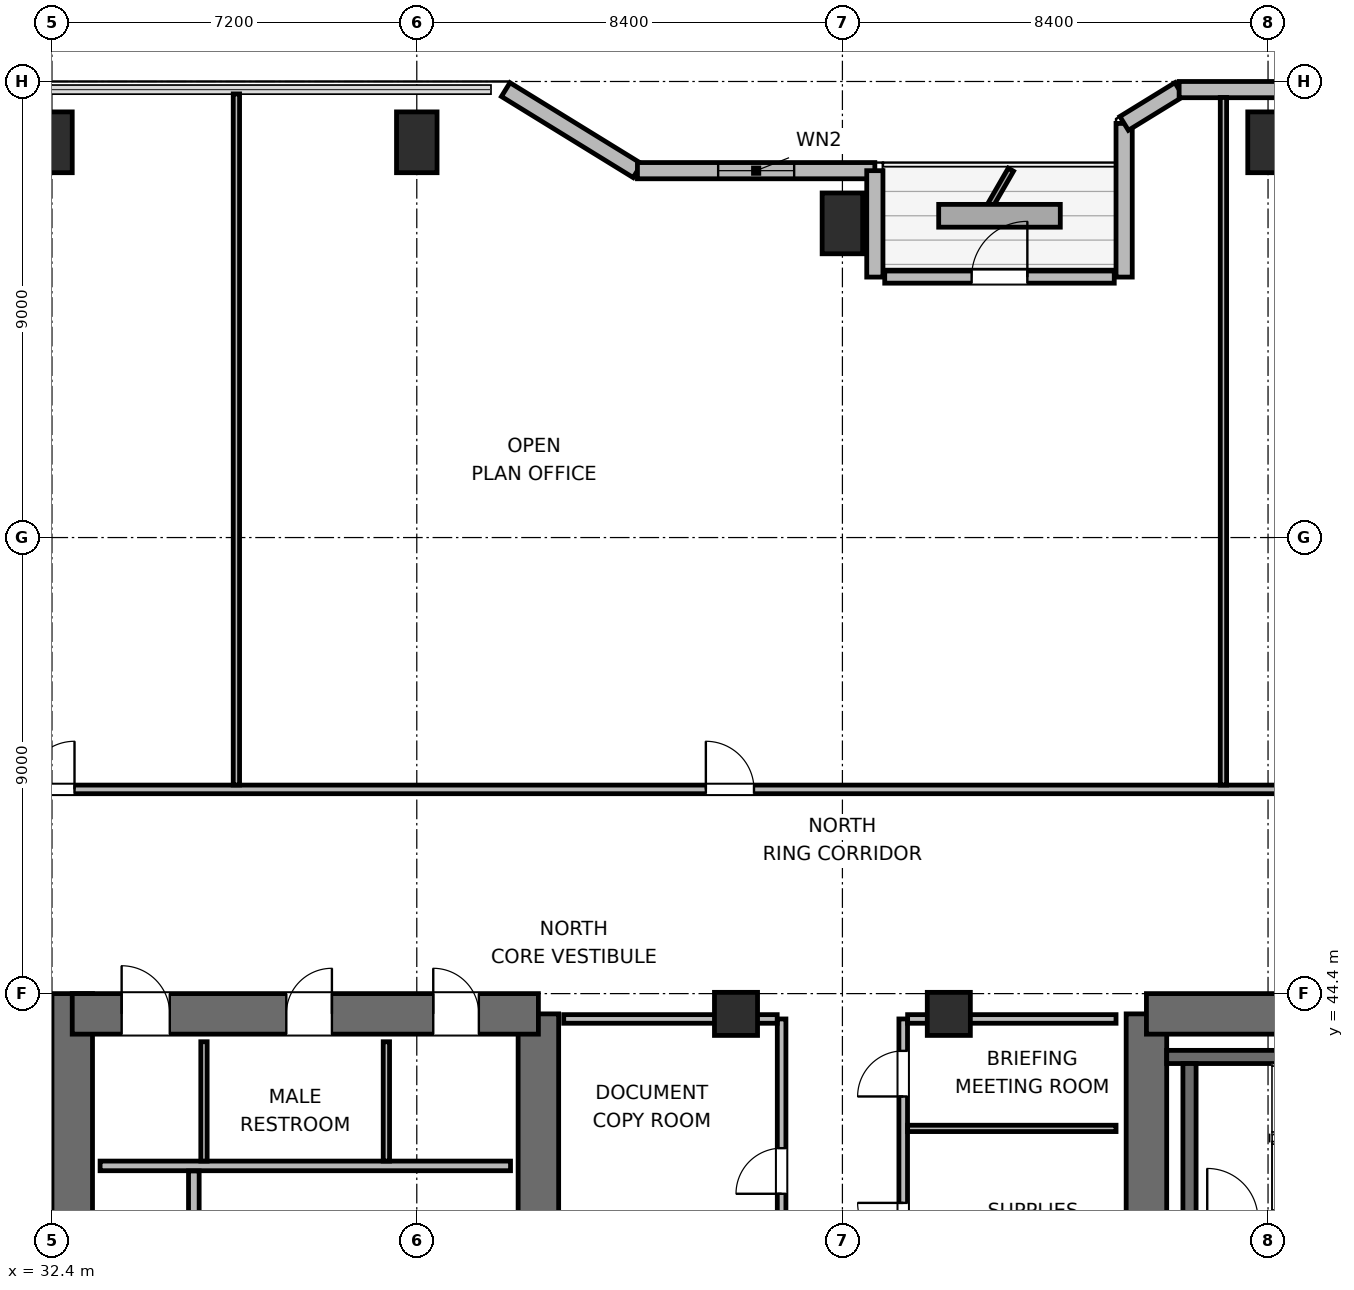
"""IFC4 building model, lengths in metres.
Left out: names, types, materials, properties, quantities, classifications, styles, units other than length and angle.
Written with IfcOpenShell. Run it as: python <this file> out.ifc"""

import sys

from ifc_helpers import new_model, si_unit, direction, frame, frame_2d, origin, origin_2d, place, context, subcontext, project, spatial, rectangle, extrude, element, fill, save


model = new_model("IFC4")
c1 = context("Model", 3, precision=1e-05, world=origin(), true_north=direction((0.0, 1.0)))
c2 = subcontext(c1, "Body", "Model", "MODEL_VIEW")
j1 = project(units=[si_unit("LENGTHUNIT", "METRE"), si_unit("PLANEANGLEUNIT", "RADIAN")], contexts=[c1])
p1 = place(None, origin())
s1 = spatial("IfcSite", under=j1, at=p1, CompositionType="ELEMENT")
p2 = place(p1, origin())
s2 = spatial("IfcBuilding", under=s1, at=p2, CompositionType="ELEMENT")
p3 = place(p2, frame((0.0, 0.0, 109.2)))
s3 = spatial("IfcBuildingStorey", under=s2, at=p3, CompositionType="ELEMENT", Elevation=109.2)
p4 = place(p3, frame((32.8, 27.6, 0.0), z_axis=(0.0, 0.0, 1.0), x_axis=(0.0, 1.0, 0.0)))
e1 = element("IfcWall", 1, at=p4, inside=s3, PredefinedType="SHEAR", context=c2, shape_type="SweptSolid", body=[
    extrude(rectangle(XDim=16.8, YDim=0.8, at=frame_2d((8.4, 0.0))), origin(), (0.0, 0.0, 1.0), 3.9),
])
p5 = place(p3, frame((42.0, 37.8, 0.0), z_axis=(0.0, 0.0, 1.0), x_axis=(0.0, 1.0, 0.0)))
e2 = element("IfcWall", 2, at=p5, inside=s3, PredefinedType="SHEAR", context=c2, shape_type="SweptSolid", body=[
    extrude(rectangle(XDim=6.2, YDim=0.8, at=frame_2d((3.1, 0.0))), origin(), (0.0, 0.0, 1.0), 3.9),
])
p6 = place(p3, frame((32.8, 44.0, 0.0), z_axis=(0.0, 0.0, 1.0), x_axis=(1.0, 0.0, 0.0)))
e3 = element("IfcWall", 3, at=p6, inside=s3, PredefinedType="SHEAR", context=c2, shape_type="SweptSolid", body=[
    extrude(rectangle(XDim=9.2, YDim=0.8, at=frame_2d((4.6, 0.0))), origin(), (0.0, 0.0, 1.0), 3.9),
])
p7 = place(p6, frame((0.975, 0.0, 0.0)))
e4 = element("IfcOpeningElement", 4, at=p7, cuts=e3, PredefinedType="OPENING", context=c2, shape_type="SweptSolid", body=[
    extrude(rectangle(XDim=0.95, YDim=2.04, at=frame_2d((0.475, 1.02))), frame((0.0, 0.41, 0.0), z_axis=(0.0, -1.0, 0.0), x_axis=(1.0, 0.0, 0.0)), (0.0, 0.0, 1.0), 0.82),
])
p8 = place(p6, frame((4.225, 0.0, 0.0)))
e5 = element("IfcOpeningElement", 5, at=p8, cuts=e3, PredefinedType="OPENING", context=c2, shape_type="SweptSolid", body=[
    extrude(rectangle(XDim=0.9, YDim=2.02, at=frame_2d((0.45, 1.01))), frame((0.0, 0.41, 0.0), z_axis=(0.0, -1.0, 0.0), x_axis=(1.0, 0.0, 0.0)), (0.0, 0.0, 1.0), 0.82),
])
p9 = place(p6, frame((7.125, 0.0, 0.0)))
e6 = element("IfcOpeningElement", 6, at=p9, cuts=e3, PredefinedType="OPENING", context=c2, shape_type="SweptSolid", body=[
    extrude(rectangle(XDim=0.9, YDim=2.02, at=frame_2d((0.45, 1.01))), frame((0.0, 0.41, 0.0), z_axis=(0.0, -1.0, 0.0), x_axis=(1.0, 0.0, 0.0)), (0.0, 0.0, 1.0), 0.82),
])
p10 = place(p3, frame((54.0, 38.0, 0.0), z_axis=(0.0, 0.0, 1.0), x_axis=(0.0, 1.0, 0.0)))
e7 = element("IfcWall", 7, at=p10, inside=s3, PredefinedType="SHEAR", context=c2, shape_type="SweptSolid", body=[
    extrude(rectangle(XDim=6.0, YDim=0.8, at=frame_2d((3.0, 0.0))), origin(), (0.0, 0.0, 1.0), 3.9),
])
p11 = place(p3, frame((54.0, 44.0, 0.0), z_axis=(0.0, 0.0, 1.0), x_axis=(1.0, 0.0, 0.0)))
e8 = element("IfcWall", 8, at=p11, inside=s3, PredefinedType="SHEAR", context=c2, shape_type="SweptSolid", body=[
    extrude(rectangle(XDim=9.2, YDim=0.8, at=frame_2d((4.6, 0.0))), origin(), (0.0, 0.0, 1.0), 3.9),
])
p12 = place(p3, frame((54.4, 43.15, 0.0), z_axis=(0.0, 0.0, 1.0), x_axis=(1.0, 0.0, 0.0)))
e9 = element("IfcWall", 9, at=p12, inside=s3, PredefinedType="SHEAR", context=c2, shape_type="SweptSolid", body=[
    extrude(rectangle(XDim=8.4, YDim=0.26, at=frame_2d((4.2, 0.0))), origin(), (0.0, 0.0, 1.0), 3.9),
])
p13 = place(p3, frame((54.85, 40.08, 0.0), z_axis=(0.0, 0.0, 1.0), x_axis=(0.0, 1.0, 0.0)))
e10 = element("IfcWall", 10, at=p13, inside=s3, PredefinedType="SHEAR", context=c2, shape_type="SweptSolid", body=[
    extrude(rectangle(XDim=2.94, YDim=0.26, at=frame_2d((1.47, 0.0))), origin(), (0.0, 0.0, 1.0), 3.9),
])
for number, where, z_axis, x_axis in (
    (11, (32.4, 61.2, 0.0), (0.0, 0.0, 1.0), (1.0, 0.0, 0.0)),
    (12, (39.6, 61.2, 0.0), (0.0, 0.0, 1.0), (1.0, 0.0, 0.0)),
    (13, (48.0, 59.6, 0.0), (0.0, 0.0, 1.0), (1.0, 0.0, 0.0)),
    (14, (56.4, 61.2, 0.0), (0.0, 0.0, 1.0), (1.0, 0.0, 0.0)),
):
    element("IfcColumn", number, at=place(p3, frame(where, z_axis=z_axis, x_axis=x_axis)), inside=s3, PredefinedType="COLUMN", context=c2, shape_type="SweptSolid", body=[
        extrude(rectangle(XDim=0.8, YDim=1.2, at=origin_2d()), origin(), (0.0, 0.0, 1.0), 3.9),
    ])
for number, where, z_axis, x_axis in (
    (15, (45.9, 44.0, 0.0), (0.0, 0.0, 1.0), (1.0, 0.0, 0.0)),
    (16, (50.1, 44.0, 0.0), (0.0, 0.0, 1.0), (1.0, 0.0, 0.0)),
):
    element("IfcColumn", number, at=place(p3, frame(where, z_axis=z_axis, x_axis=x_axis)), inside=s3, PredefinedType="COLUMN", context=c2, shape_type="SweptSolid", body=[
        extrude(rectangle(XDim=0.85, YDim=0.85, at=origin_2d()), origin(), (0.0, 0.0, 1.0), 3.9),
    ])
p14 = place(p3, frame((41.355, 62.24, 0.0), z_axis=(0.0, 0.0, 1.0), x_axis=(0.851630857047, -0.524142044989, 0.0)))
e17 = element("IfcWall", 17, at=p14, inside=s3, PredefinedType="SOLIDWALL", context=c2, shape_type="SweptSolid", body=[
    extrude(rectangle(XDim=3.053, YDim=0.32, at=frame_2d((1.526, 0.0))), origin(), (0.0, 0.0, 1.0), 2.875),
])
p15 = place(p3, frame((43.955, 60.64, 0.0), z_axis=(0.0, 0.0, 1.0), x_axis=(1.0, 0.0, 0.0)))
e18 = element("IfcWall", 18, at=p15, inside=s3, PredefinedType="SOLIDWALL", context=c2, shape_type="SweptSolid", body=[
    extrude(rectangle(XDim=4.685, YDim=0.32, at=frame_2d((2.343, 0.0))), origin(), (0.0, 0.0, 1.0), 2.875),
])
p16 = place(p15, frame((1.593, 0.0, 0.85)))
e19 = element("IfcOpeningElement", 19, at=p16, cuts=e18, PredefinedType="OPENING", context=c2, shape_type="SweptSolid", body=[
    extrude(rectangle(XDim=1.5, YDim=1.1, at=frame_2d((0.75, 0.55))), frame((0.0, 0.17, 0.0), z_axis=(0.0, -1.0, 0.0), x_axis=(1.0, 0.0, 0.0)), (0.0, 0.0, 1.0), 0.34),
])
p17 = place(p3, frame((48.64, 60.64, 0.0), z_axis=(0.0, 0.0, 1.0), x_axis=(0.0, -1.0, 0.0)))
e20 = element("IfcWall", 20, at=p17, inside=s3, PredefinedType="SOLIDWALL", context=c2, shape_type="SweptSolid", body=[
    extrude(rectangle(XDim=2.1, YDim=0.32, at=frame_2d((1.05, 0.0))), origin(), (0.0, 0.0, 1.0), 2.875),
])
p18 = place(p3, frame((48.835, 58.54, 0.0), z_axis=(0.0, 0.0, 1.0), x_axis=(1.0, 0.0, 0.0)))
e21 = element("IfcWall", 21, at=p18, inside=s3, PredefinedType="SOLIDWALL", context=c2, shape_type="SweptSolid", body=[
    extrude(rectangle(XDim=4.53, YDim=0.24, at=frame_2d((2.265, 0.0))), origin(), (0.0, 0.0, 1.0), 3.64),
])
p19 = place(p18, frame((1.715, 0.0, 0.0)))
e22 = element("IfcOpeningElement", 22, at=p19, cuts=e21, PredefinedType="OPENING", context=c2, shape_type="SweptSolid", body=[
    extrude(rectangle(XDim=1.1, YDim=2.04, at=frame_2d((0.55, 1.02))), frame((0.0, 0.13, 0.0), z_axis=(0.0, -1.0, 0.0), x_axis=(1.0, 0.0, 0.0)), (0.0, 0.0, 1.0), 0.26),
])
p20 = place(p3, frame((53.56, 58.54, 0.0), z_axis=(0.0, 0.0, 1.0), x_axis=(0.0, 1.0, 0.0)))
e23 = element("IfcWall", 23, at=p20, inside=s3, PredefinedType="SOLIDWALL", context=c2, shape_type="SweptSolid", body=[
    extrude(rectangle(XDim=3.032, YDim=0.32, at=frame_2d((1.516, 0.0))), origin(), (0.0, 0.0, 1.0), 2.875),
])
p21 = place(p3, frame((53.56, 61.573, 0.0), z_axis=(0.0, 0.0, 1.0), x_axis=(0.851776724646, 0.523904964045, 0.0)))
e24 = element("IfcWall", 24, at=p21, inside=s3, PredefinedType="SOLIDWALL", context=c2, shape_type="SweptSolid", body=[
    extrude(rectangle(XDim=1.274, YDim=0.32, at=frame_2d((0.637, 0.0))), origin(), (0.0, 0.0, 1.0), 3.64),
])
p22 = place(p3, frame((54.645, 62.24, 0.0), z_axis=(0.0, 0.0, 1.0), x_axis=(1.0, 0.0, 0.0)))
e25 = element("IfcWall", 25, at=p22, inside=s3, PredefinedType="SOLIDWALL", context=c2, shape_type="SweptSolid", body=[
    extrude(rectangle(XDim=10.734, YDim=0.32, at=frame_2d((5.367, 0.0))), origin(), (0.0, 0.0, 1.0), 3.64),
])
p23 = place(p3, frame((33.35, 41.0, 0.0), z_axis=(0.0, 0.0, 1.0), x_axis=(1.0, 0.0, 0.0)))
e26 = element("IfcWall", 26, at=p23, inside=s3, PredefinedType="PLUMBINGWALL", context=c2, shape_type="SweptSolid", body=[
    extrude(rectangle(XDim=8.1, YDim=0.19, at=frame_2d((4.05, 0.0))), origin(), (0.0, 0.0, 1.0), 3.64),
])
for number, where, z_axis, x_axis in (
    (27, (35.4, 41.095, 0.0), (0.0, 0.0, 1.0), (0.0, 1.0, 0.0)),
    (28, (39.0, 41.095, 0.0), (0.0, 0.0, 1.0), (0.0, 1.0, 0.0)),
):
    element("IfcWall", number, at=place(p3, frame(where, z_axis=z_axis, x_axis=x_axis)), inside=s3, PredefinedType="PARTITIONING", context=c2, shape_type="SweptSolid", body=[
        extrude(rectangle(XDim=2.355, YDim=0.125, at=frame_2d((1.177, 0.0))), origin(), (0.0, 0.0, 1.0), 3.64),
    ])
p24 = place(p3, frame((35.2, 39.58, 0.0), z_axis=(0.0, 0.0, 1.0), x_axis=(0.0, 1.0, 0.0)))
e29 = element("IfcWall", 29, at=p24, inside=s3, PredefinedType="PARTITIONING", context=c2, shape_type="SweptSolid", body=[
    extrude(rectangle(XDim=1.32, YDim=0.21, at=frame_2d((0.66, 0.0))), origin(), (0.0, 0.0, 1.0), 3.64),
])
p25 = place(p3, frame((46.8, 37.9, 0.0), z_axis=(0.0, 0.0, 1.0), x_axis=(0.0, 1.0, 0.0)))
e30 = element("IfcWall", 30, at=p25, inside=s3, PredefinedType="PARTITIONING", context=c2, shape_type="SweptSolid", body=[
    extrude(rectangle(XDim=6.0, YDim=0.17, at=frame_2d((3.0, 0.0))), origin(), (0.0, 0.0, 1.0), 3.64),
])
p26 = place(p25, frame((2.55, 0.0, 0.0)))
e31 = element("IfcOpeningElement", 31, at=p26, cuts=e30, PredefinedType="OPENING", context=c2, shape_type="SweptSolid", body=[
    extrude(rectangle(XDim=0.9, YDim=2.02, at=frame_2d((0.45, 1.01))), frame((0.0, 0.095, 0.0), z_axis=(0.0, -1.0, 0.0), x_axis=(1.0, 0.0, 0.0)), (0.0, 0.0, 1.0), 0.19),
])
p27 = place(p3, frame((42.5, 43.9, 0.0), z_axis=(0.0, 0.0, 1.0), x_axis=(1.0, 0.0, 0.0)))
e32 = element("IfcWall", 32, at=p27, inside=s3, PredefinedType="PARTITIONING", context=c2, shape_type="SweptSolid", body=[
    extrude(rectangle(XDim=4.213, YDim=0.17, at=frame_2d((2.106, 0.0))), origin(), (0.0, 0.0, 1.0), 2.525),
])
p28 = place(p3, frame((49.2, 37.9, 0.0), z_axis=(0.0, 0.0, 1.0), x_axis=(0.0, 1.0, 0.0)))
e33 = element("IfcWall", 33, at=p28, inside=s3, PredefinedType="PARTITIONING", context=c2, shape_type="SweptSolid", body=[
    extrude(rectangle(XDim=6.0, YDim=0.17, at=frame_2d((3.0, 0.0))), origin(), (0.0, 0.0, 1.0), 3.64),
])
p29 = place(p28, frame((1.47, 0.0, 0.0)))
e34 = element("IfcOpeningElement", 34, at=p29, cuts=e33, PredefinedType="OPENING", context=c2, shape_type="SweptSolid", body=[
    extrude(rectangle(XDim=0.9, YDim=2.02, at=frame_2d((0.45, 1.01))), frame((0.0, 0.095, 0.0), z_axis=(0.0, -1.0, 0.0), x_axis=(1.0, 0.0, 0.0)), (0.0, 0.0, 1.0), 0.19),
])
p30 = place(p28, frame((4.47, 0.0, 0.0)))
e35 = element("IfcOpeningElement", 35, at=p30, cuts=e33, PredefinedType="OPENING", context=c2, shape_type="SweptSolid", body=[
    extrude(rectangle(XDim=0.9, YDim=2.02, at=frame_2d((0.45, 1.01))), frame((0.0, 0.095, 0.0), z_axis=(0.0, -1.0, 0.0), x_axis=(1.0, 0.0, 0.0)), (0.0, 0.0, 1.0), 0.19),
])
p31 = place(p3, frame((49.287, 43.9, 0.0), z_axis=(0.0, 0.0, 1.0), x_axis=(1.0, 0.0, 0.0)))
e36 = element("IfcWall", 36, at=p31, inside=s3, PredefinedType="PARTITIONING", context=c2, shape_type="SweptSolid", body=[
    extrude(rectangle(XDim=4.113, YDim=0.17, at=frame_2d((2.056, 0.0))), origin(), (0.0, 0.0, 1.0), 2.525),
])
p32 = place(p3, frame((49.287, 41.74, 0.0), z_axis=(0.0, 0.0, 1.0), x_axis=(1.0, 0.0, 0.0)))
e37 = element("IfcWall", 37, at=p32, inside=s3, PredefinedType="PARTITIONING", context=c2, shape_type="SweptSolid", body=[
    extrude(rectangle(XDim=4.113, YDim=0.125, at=frame_2d((2.056, 0.0))), origin(), (0.0, 0.0, 1.0), 3.64),
])
p33 = place(p3, frame((28.7, 48.43, 0.0), z_axis=(0.0, 0.0, 1.0), x_axis=(1.0, 0.0, 0.0)))
e38 = element("IfcWall", 38, at=p33, inside=s3, PredefinedType="PARTITIONING", context=c2, shape_type="SweptSolid", body=[
    extrude(rectangle(XDim=38.6, YDim=0.17, at=frame_2d((19.3, 0.0))), origin(), (0.0, 0.0, 1.0), 3.64),
])
p34 = place(p33, frame((3.195, 0.0, 0.0)))
e39 = element("IfcOpeningElement", 39, at=p34, cuts=e38, PredefinedType="OPENING", context=c2, shape_type="SweptSolid", body=[
    extrude(rectangle(XDim=0.95, YDim=2.04, at=frame_2d((0.475, 1.02))), frame((0.0, 0.095, 0.0), z_axis=(0.0, -1.0, 0.0), x_axis=(1.0, 0.0, 0.0)), (0.0, 0.0, 1.0), 0.19),
])
p35 = place(p33, frame((16.605, 0.0, 0.0)))
e40 = element("IfcOpeningElement", 40, at=p35, cuts=e38, PredefinedType="OPENING", context=c2, shape_type="SweptSolid", body=[
    extrude(rectangle(XDim=0.95, YDim=2.04, at=frame_2d((0.475, 1.02))), frame((0.0, 0.095, 0.0), z_axis=(0.0, -1.0, 0.0), x_axis=(1.0, 0.0, 0.0)), (0.0, 0.0, 1.0), 0.19),
])
p36 = place(p33, frame((32.235, 0.0, 0.0)))
e41 = element("IfcOpeningElement", 41, at=p36, cuts=e38, PredefinedType="OPENING", context=c2, shape_type="SweptSolid", body=[
    extrude(rectangle(XDim=0.95, YDim=2.04, at=frame_2d((0.475, 1.02))), frame((0.0, 0.095, 0.0), z_axis=(0.0, -1.0, 0.0), x_axis=(1.0, 0.0, 0.0)), (0.0, 0.0, 1.0), 0.19),
])
p37 = place(p3, frame((36.04, 48.517, 0.0), z_axis=(0.0, 0.0, 1.0), x_axis=(0.0, 1.0, 0.0)))
e42 = element("IfcWall", 42, at=p37, inside=s3, PredefinedType="PARTITIONING", context=c2, shape_type="SweptSolid", body=[
    extrude(rectangle(XDim=13.638, YDim=0.125, at=frame_2d((6.819, 0.0))), origin(), (0.0, 0.0, 1.0), 3.64),
])
p38 = place(p3, frame((55.52, 48.517, 0.0), z_axis=(0.0, 0.0, 1.0), x_axis=(0.0, 1.0, 0.0)))
e43 = element("IfcWall", 43, at=p38, inside=s3, PredefinedType="PARTITIONING", context=c2, shape_type="SweptSolid", body=[
    extrude(rectangle(XDim=13.568, YDim=0.125, at=frame_2d((6.784, 0.0))), origin(), (0.0, 0.0, 1.0), 3.003),
])
p39 = place(p16, origin())
e44 = element("IfcWindow", 44, at=p39, inside=s3, PartitioningType="SINGLE_PANEL", PredefinedType="WINDOW", context=c2, shape_type="SweptSolid", body=[
    extrude(rectangle(XDim=1.5, YDim=1.1, at=frame_2d((0.75, 0.55))), frame((0.0, 0.03, 0.0), z_axis=(0.0, -1.0, 0.0), x_axis=(1.0, 0.0, 0.0)), (0.0, 0.0, 1.0), 0.06),
])
fill(e19, e44)
p40 = place(p19, origin())
e45 = element("IfcDoor", 45, at=p40, inside=s3, OperationType="SINGLE_SWING_RIGHT", PredefinedType="DOOR", context=c2, shape_type="SweptSolid", body=[
    extrude(rectangle(XDim=1.1, YDim=2.04, at=frame_2d((0.55, 1.02))), frame((0.0, 0.025, 0.0), z_axis=(0.0, -1.0, 0.0), x_axis=(1.0, 0.0, 0.0)), (0.0, 0.0, 1.0), 0.05),
])
fill(e22, e45)
p41 = place(p7, origin())
e46 = element("IfcDoor", 46, at=p41, inside=s3, OperationType="SINGLE_SWING_LEFT", PredefinedType="DOOR", context=c2, shape_type="SweptSolid", body=[
    extrude(rectangle(XDim=0.95, YDim=2.04, at=frame_2d((0.475, 1.02))), frame((0.0, 0.025, 0.0), z_axis=(0.0, -1.0, 0.0), x_axis=(1.0, 0.0, 0.0)), (0.0, 0.0, 1.0), 0.05),
])
fill(e4, e46)
p42 = place(p8, origin())
e47 = element("IfcDoor", 47, at=p42, inside=s3, OperationType="SINGLE_SWING_RIGHT", PredefinedType="DOOR", context=c2, shape_type="SweptSolid", body=[
    extrude(rectangle(XDim=0.9, YDim=2.02, at=frame_2d((0.45, 1.01))), frame((0.0, 0.025, 0.0), z_axis=(0.0, -1.0, 0.0), x_axis=(1.0, 0.0, 0.0)), (0.0, 0.0, 1.0), 0.05),
])
fill(e5, e47)
p43 = place(p9, origin())
e48 = element("IfcDoor", 48, at=p43, inside=s3, OperationType="SINGLE_SWING_LEFT", PredefinedType="DOOR", context=c2, shape_type="SweptSolid", body=[
    extrude(rectangle(XDim=0.9, YDim=2.02, at=frame_2d((0.45, 1.01))), frame((0.0, 0.025, 0.0), z_axis=(0.0, -1.0, 0.0), x_axis=(1.0, 0.0, 0.0)), (0.0, 0.0, 1.0), 0.05),
])
fill(e6, e48)
p44 = place(p26, origin())
e49 = element("IfcDoor", 49, at=p44, inside=s3, OperationType="SINGLE_SWING_LEFT", PredefinedType="DOOR", context=c2, shape_type="SweptSolid", body=[
    extrude(rectangle(XDim=0.9, YDim=2.02, at=frame_2d((0.45, 1.01))), frame((0.0, 0.025, 0.0), z_axis=(0.0, -1.0, 0.0), x_axis=(1.0, 0.0, 0.0)), (0.0, 0.0, 1.0), 0.05),
])
fill(e31, e49)
p45 = place(p29, origin())
e50 = element("IfcDoor", 50, at=p45, inside=s3, OperationType="SINGLE_SWING_RIGHT", PredefinedType="DOOR", context=c2, shape_type="SweptSolid", body=[
    extrude(rectangle(XDim=0.9, YDim=2.02, at=frame_2d((0.45, 1.01))), frame((0.0, 0.025, 0.0), z_axis=(0.0, -1.0, 0.0), x_axis=(1.0, 0.0, 0.0)), (0.0, 0.0, 1.0), 0.05),
])
fill(e34, e50)
p46 = place(p30, origin())
e51 = element("IfcDoor", 51, at=p46, inside=s3, OperationType="SINGLE_SWING_LEFT", PredefinedType="DOOR", context=c2, shape_type="SweptSolid", body=[
    extrude(rectangle(XDim=0.9, YDim=2.02, at=frame_2d((0.45, 1.01))), frame((0.0, 0.025, 0.0), z_axis=(0.0, -1.0, 0.0), x_axis=(1.0, 0.0, 0.0)), (0.0, 0.0, 1.0), 0.05),
])
fill(e35, e51)
p47 = place(p34, origin())
e52 = element("IfcDoor", 52, at=p47, inside=s3, OperationType="SINGLE_SWING_RIGHT", PredefinedType="DOOR", context=c2, shape_type="SweptSolid", body=[
    extrude(rectangle(XDim=0.95, YDim=2.04, at=frame_2d((0.475, 1.02))), frame((0.0, 0.025, 0.0), z_axis=(0.0, -1.0, 0.0), x_axis=(1.0, 0.0, 0.0)), (0.0, 0.0, 1.0), 0.05),
])
fill(e39, e52)
p48 = place(p35, origin())
e53 = element("IfcDoor", 53, at=p48, inside=s3, OperationType="SINGLE_SWING_LEFT", PredefinedType="DOOR", context=c2, shape_type="SweptSolid", body=[
    extrude(rectangle(XDim=0.95, YDim=2.04, at=frame_2d((0.475, 1.02))), frame((0.0, 0.025, 0.0), z_axis=(0.0, -1.0, 0.0), x_axis=(1.0, 0.0, 0.0)), (0.0, 0.0, 1.0), 0.05),
])
fill(e40, e53)
save(model, sys.argv[1])
